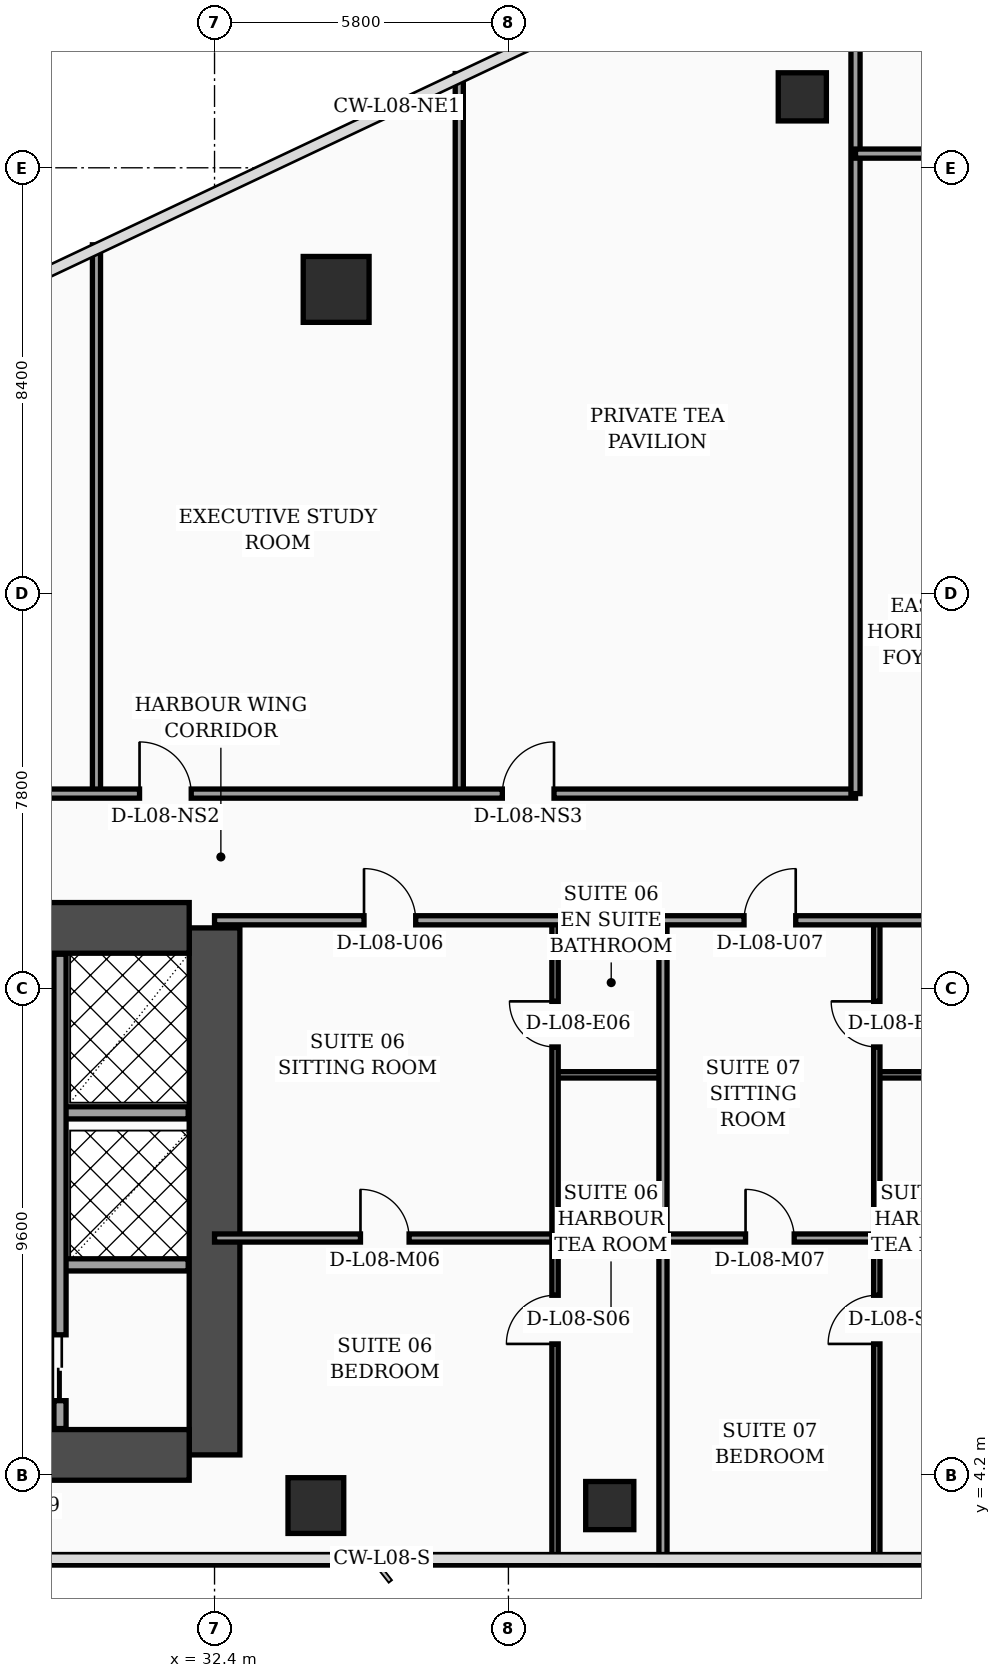
"""IFC4 building model, lengths in metres.
Left out: names, types, materials, properties, quantities, classifications, styles, units other than length and angle.
Written with IfcOpenShell. Run it as: python <this file> out.ifc"""

import sys

from ifc_helpers import new_model, si_unit, direction, frame, frame_2d, origin, origin_2d, place, context, subcontext, project, spatial, rectangle, hollow_rectangle, circle, extrude, element, fill, save


model = new_model("IFC4")
c1 = context("Model", 3, precision=1e-05, world=origin(), true_north=direction((0.0, 1.0)))
c2 = subcontext(c1, "Body", "Model", "MODEL_VIEW")
j1 = project(units=[si_unit("LENGTHUNIT", "METRE"), si_unit("PLANEANGLEUNIT", "RADIAN")], contexts=[c1])
p1 = place(None, origin())
s1 = spatial("IfcSite", under=j1, at=p1, CompositionType="ELEMENT")
p2 = place(p1, origin())
s2 = spatial("IfcBuilding", under=s1, at=p2, CompositionType="ELEMENT")
p3 = place(p2, frame((0.0, 0.0, 38.4)))
s3 = spatial("IfcBuildingStorey", under=s2, at=p3, CompositionType="ELEMENT", Elevation=38.4)
p4 = place(p3, frame((32.4, 4.6, 0.0), z_axis=(0.0, 0.0, 1.0), x_axis=(0.0, 1.0, 0.0)))
e1 = element("IfcWall", 1, at=p4, inside=s3, PredefinedType="SHEAR", context=c2, shape_type="SweptSolid", body=[
    extrude(rectangle(XDim=10.4, YDim=1.0, at=frame_2d((5.2, 0.0))), origin(), (0.0, 0.0, 1.0), 3.56),
])
p5 = place(p3, frame((22.1, 15.0, 0.0), z_axis=(0.0, 0.0, 1.0), x_axis=(1.0, 0.0, 0.0)))
e2 = element("IfcWall", 2, at=p5, inside=s3, PredefinedType="SHEAR", context=c2, shape_type="SweptSolid", body=[
    extrude(rectangle(XDim=9.8, YDim=1.0, at=frame_2d((4.9, 0.0))), origin(), (0.0, 0.0, 1.0), 3.56),
])
p6 = place(p5, frame((4.8, 0.0, 0.0)))
e3 = element("IfcOpeningElement", 3, at=p6, cuts=e2, PredefinedType="OPENING", context=c2, shape_type="SweptSolid", body=[
    extrude(rectangle(XDim=1.1, YDim=2.2, at=frame_2d((0.55, 1.1))), frame((0.0, 0.51, 0.0), z_axis=(0.0, -1.0, 0.0), x_axis=(1.0, 0.0, 0.0)), (0.0, 0.0, 1.0), 1.02),
])
p7 = place(p3, frame((22.1, 4.6, 0.0), z_axis=(0.0, 0.0, 1.0), x_axis=(1.0, 0.0, 0.0)))
e4 = element("IfcWall", 4, at=p7, inside=s3, PredefinedType="SHEAR", context=c2, shape_type="SweptSolid", body=[
    extrude(rectangle(XDim=9.8, YDim=1.0, at=frame_2d((4.9, 0.0))), origin(), (0.0, 0.0, 1.0), 3.56),
])
p8 = place(p3, frame((34.4, 3.6, 0.0), z_axis=(0.0, 0.0, 1.0), x_axis=(1.0, 0.0, 0.0)))
e5 = element("IfcColumn", 5, at=p8, inside=s3, PredefinedType="COLUMN", context=c2, shape_type="SweptSolid", body=[
    extrude(hollow_rectangle(XDim=1.1, YDim=1.1, WallThickness=0.045, at=origin_2d()), origin(), (0.0, 0.0, 1.0), 3.56),
])
p9 = place(p3, frame((40.2, 3.6, 0.0), z_axis=(0.0, 0.0, 1.0), x_axis=(1.0, 0.0, 0.0)))
e6 = element("IfcColumn", 6, at=p9, inside=s3, PredefinedType="COLUMN", context=c2, shape_type="SweptSolid", body=[
    extrude(hollow_rectangle(XDim=0.95, YDim=0.95, WallThickness=0.04, at=origin_2d()), origin(), (0.0, 0.0, 1.0), 3.56),
])
p10 = place(p3, frame((34.8, 27.6, 0.0), z_axis=(0.0, 0.0, 1.0), x_axis=(1.0, 0.0, 0.0)))
e7 = element("IfcColumn", 7, at=p10, inside=s3, PredefinedType="COLUMN", context=c2, shape_type="SweptSolid", body=[
    extrude(circle(Radius=0.65, at=origin_2d()), origin(), (0.0, 0.0, 1.0), 3.56),
])
p11 = place(p3, frame((44.0, 31.4, 0.0), z_axis=(0.0, 0.0, 1.0), x_axis=(1.0, 0.0, 0.0)))
e8 = element("IfcColumn", 8, at=p11, inside=s3, PredefinedType="COLUMN", context=c2, shape_type="SweptSolid", body=[
    extrude(hollow_rectangle(XDim=0.95, YDim=0.95, WallThickness=0.04, at=origin_2d()), origin(), (0.0, 0.0, 1.0), 3.56),
])
p12 = place(p3, frame((27.02, 11.35, 0.0), z_axis=(0.0, 0.0, 1.0), x_axis=(1.0, 0.0, 0.0)))
e9 = element("IfcWall", 9, at=p12, inside=s3, PredefinedType="SOLIDWALL", context=c2, shape_type="SweptSolid", body=[
    extrude(rectangle(XDim=4.86, YDim=0.24, at=frame_2d((2.43, 0.0))), origin(), (0.0, 0.0, 1.0), 3.56),
])
p13 = place(p12, frame((0.45, 0.0, 0.0)))
e10 = element("IfcOpeningElement", 10, at=p13, cuts=e9, PredefinedType="OPENING", context=c2, shape_type="SweptSolid", body=[
    extrude(rectangle(XDim=1.3, YDim=2.35, at=frame_2d((0.65, 1.175))), frame((0.0, 0.13, 0.0), z_axis=(0.0, -1.0, 0.0), x_axis=(1.0, 0.0, 0.0)), (0.0, 0.0, 1.0), 0.26),
])
p14 = place(p3, frame((27.02, 8.35, 0.0), z_axis=(0.0, 0.0, 1.0), x_axis=(1.0, 0.0, 0.0)))
e11 = element("IfcWall", 11, at=p14, inside=s3, PredefinedType="SOLIDWALL", context=c2, shape_type="SweptSolid", body=[
    extrude(rectangle(XDim=4.86, YDim=0.24, at=frame_2d((2.43, 0.0))), origin(), (0.0, 0.0, 1.0), 3.56),
])
p15 = place(p3, frame((29.35, 5.12, 0.0), z_axis=(0.0, 0.0, 1.0), x_axis=(0.0, 1.0, 0.0)))
e12 = element("IfcWall", 12, at=p15, inside=s3, PredefinedType="SOLIDWALL", context=c2, shape_type="SweptSolid", body=[
    extrude(rectangle(XDim=9.36, YDim=0.24, at=frame_2d((4.68, 0.0))), origin(), (0.0, 0.0, 1.0), 3.56),
])
p16 = place(p15, frame((0.55, 0.0, 0.0)))
e13 = element("IfcOpeningElement", 13, at=p16, cuts=e12, PredefinedType="OPENING", context=c2, shape_type="SweptSolid", body=[
    extrude(rectangle(XDim=1.3, YDim=2.35, at=frame_2d((0.65, 1.175))), frame((0.0, 0.13, 0.0), z_axis=(0.0, -1.0, 0.0), x_axis=(1.0, 0.0, 0.0)), (0.0, 0.0, 1.0), 0.26),
])
p17 = place(p3, frame((39.12, 12.1, 0.0), z_axis=(0.0, 0.0, 1.0), x_axis=(1.0, 0.0, 0.0)))
e14 = element("IfcWall", 14, at=p17, inside=s3, PredefinedType="PARTITIONING", context=c2, shape_type="SweptSolid", body=[
    extrude(rectangle(XDim=2.13, YDim=0.125, at=frame_2d((1.065, 0.0))), origin(), (0.0, 0.0, 1.0), 3.56),
])
p18 = place(p3, frame((32.4, 8.88, 0.0), z_axis=(0.0, 0.0, 1.0), x_axis=(1.0, 0.0, 0.0)))
e15 = element("IfcWall", 15, at=p18, inside=s3, PredefinedType="PARTITIONING", context=c2, shape_type="SweptSolid", body=[
    extrude(rectangle(XDim=6.72, YDim=0.16, at=frame_2d((3.36, 0.0))), origin(), (0.0, 0.0, 1.0), 2.84),
])
p19 = place(p18, frame((2.88, 0.0, 0.0)))
e16 = element("IfcOpeningElement", 16, at=p19, cuts=e15, PredefinedType="OPENING", context=c2, shape_type="SweptSolid", body=[
    extrude(rectangle(XDim=0.96, YDim=2.2, at=frame_2d((0.48, 1.1))), frame((0.0, 0.09, 0.0), z_axis=(0.0, -1.0, 0.0), x_axis=(1.0, 0.0, 0.0)), (0.0, 0.0, 1.0), 0.18),
])
p20 = place(p3, frame((39.12, 2.44, 0.0), z_axis=(0.0, 0.0, 1.0), x_axis=(0.0, 1.0, 0.0)))
e17 = element("IfcWall", 17, at=p20, inside=s3, PredefinedType="PARTITIONING", context=c2, shape_type="SweptSolid", body=[
    extrude(rectangle(XDim=12.71, YDim=0.125, at=frame_2d((6.355, 0.0))), origin(), (0.0, 0.0, 1.0), 2.84),
])
p21 = place(p20, frame((4.35, 0.0, 0.0)))
e18 = element("IfcOpeningElement", 18, at=p21, cuts=e17, PredefinedType="OPENING", context=c2, shape_type="SweptSolid", body=[
    extrude(rectangle(XDim=0.96, YDim=2.2, at=frame_2d((0.48, 1.1))), frame((0.0, 0.073, 0.0), z_axis=(0.0, -1.0, 0.0), x_axis=(1.0, 0.0, 0.0)), (0.0, 0.0, 1.0), 0.145),
])
p22 = place(p20, frame((10.21, 0.0, 0.0)))
e19 = element("IfcOpeningElement", 19, at=p22, cuts=e17, PredefinedType="OPENING", context=c2, shape_type="SweptSolid", body=[
    extrude(rectangle(XDim=0.9, YDim=2.15, at=frame_2d((0.45, 1.075))), frame((0.0, 0.073, 0.0), z_axis=(0.0, -1.0, 0.0), x_axis=(1.0, 0.0, 0.0)), (0.0, 0.0, 1.0), 0.145),
])
p23 = place(p3, frame((45.47, 12.1, 0.0), z_axis=(0.0, 0.0, 1.0), x_axis=(1.0, 0.0, 0.0)))
e20 = element("IfcWall", 20, at=p23, inside=s3, PredefinedType="PARTITIONING", context=c2, shape_type="SweptSolid", body=[
    extrude(rectangle(XDim=1.93, YDim=0.125, at=frame_2d((0.965, 0.0))), origin(), (0.0, 0.0, 1.0), 2.84),
])
p24 = place(p3, frame((41.25, 8.88, 0.0), z_axis=(0.0, 0.0, 1.0), x_axis=(1.0, 0.0, 0.0)))
e21 = element("IfcWall", 21, at=p24, inside=s3, PredefinedType="PARTITIONING", context=c2, shape_type="SweptSolid", body=[
    extrude(rectangle(XDim=4.22, YDim=0.16, at=frame_2d((2.11, 0.0))), origin(), (0.0, 0.0, 1.0), 3.56),
])
p25 = place(p24, frame((1.63, 0.0, 0.0)))
e22 = element("IfcOpeningElement", 22, at=p25, cuts=e21, PredefinedType="OPENING", context=c2, shape_type="SweptSolid", body=[
    extrude(rectangle(XDim=0.96, YDim=2.2, at=frame_2d((0.48, 1.1))), frame((0.0, 0.09, 0.0), z_axis=(0.0, -1.0, 0.0), x_axis=(1.0, 0.0, 0.0)), (0.0, 0.0, 1.0), 0.18),
])
p26 = place(p3, frame((45.47, 2.44, 0.0), z_axis=(0.0, 0.0, 1.0), x_axis=(0.0, 1.0, 0.0)))
e23 = element("IfcWall", 23, at=p26, inside=s3, PredefinedType="PARTITIONING", context=c2, shape_type="SweptSolid", body=[
    extrude(rectangle(XDim=12.71, YDim=0.125, at=frame_2d((6.355, 0.0))), origin(), (0.0, 0.0, 1.0), 3.04),
])
p27 = place(p26, frame((4.35, 0.0, 0.0)))
e24 = element("IfcOpeningElement", 24, at=p27, cuts=e23, PredefinedType="OPENING", context=c2, shape_type="SweptSolid", body=[
    extrude(rectangle(XDim=0.96, YDim=2.2, at=frame_2d((0.48, 1.1))), frame((0.0, 0.073, 0.0), z_axis=(0.0, -1.0, 0.0), x_axis=(1.0, 0.0, 0.0)), (0.0, 0.0, 1.0), 0.145),
])
p28 = place(p26, frame((10.21, 0.0, 0.0)))
e25 = element("IfcOpeningElement", 25, at=p28, cuts=e23, PredefinedType="OPENING", context=c2, shape_type="SweptSolid", body=[
    extrude(rectangle(XDim=0.9, YDim=2.15, at=frame_2d((0.45, 1.075))), frame((0.0, 0.073, 0.0), z_axis=(0.0, -1.0, 0.0), x_axis=(1.0, 0.0, 0.0)), (0.0, 0.0, 1.0), 0.145),
])
p29 = place(p3, frame((41.25, 2.44, 0.0), z_axis=(0.0, 0.0, 1.0), x_axis=(0.0, 1.0, 0.0)))
e26 = element("IfcWall", 26, at=p29, inside=s3, PredefinedType="PARTITIONING", context=c2, shape_type="SweptSolid", body=[
    extrude(rectangle(XDim=12.71, YDim=0.16, at=frame_2d((6.355, 0.0))), origin(), (0.0, 0.0, 1.0), 3.04),
])
p30 = place(p3, frame((32.4, 15.15, 0.0), z_axis=(0.0, 0.0, 1.0), x_axis=(1.0, 0.0, 0.0)))
e27 = element("IfcWall", 27, at=p30, inside=s3, PredefinedType="PARTITIONING", context=c2, shape_type="SweptSolid", body=[
    extrude(rectangle(XDim=15.0, YDim=0.18, at=frame_2d((7.5, 0.0))), origin(), (0.0, 0.0, 1.0), 2.84),
])
p31 = place(p30, frame((2.95, 0.0, 0.0)))
e28 = element("IfcOpeningElement", 28, at=p31, cuts=e27, PredefinedType="OPENING", context=c2, shape_type="SweptSolid", body=[
    extrude(rectangle(XDim=1.02, YDim=2.2, at=frame_2d((0.51, 1.1))), frame((0.0, 0.1, 0.0), z_axis=(0.0, -1.0, 0.0), x_axis=(1.0, 0.0, 0.0)), (0.0, 0.0, 1.0), 0.2),
])
p32 = place(p30, frame((10.45, 0.0, 0.0)))
e29 = element("IfcOpeningElement", 29, at=p32, cuts=e27, PredefinedType="OPENING", context=c2, shape_type="SweptSolid", body=[
    extrude(rectangle(XDim=1.02, YDim=2.2, at=frame_2d((0.51, 1.1))), frame((0.0, 0.1, 0.0), z_axis=(0.0, -1.0, 0.0), x_axis=(1.0, 0.0, 0.0)), (0.0, 0.0, 1.0), 0.2),
])
p33 = place(p3, frame((30.07, 17.65, 0.0), z_axis=(0.0, 0.0, 1.0), x_axis=(0.0, 1.0, 0.0)))
e30 = element("IfcWall", 30, at=p33, inside=s3, PredefinedType="PARTITIONING", context=c2, shape_type="SweptSolid", body=[
    extrude(rectangle(XDim=10.83, YDim=0.16, at=frame_2d((5.415, 0.0))), origin(), (0.0, 0.0, 1.0), 2.84),
])
p34 = place(p3, frame((37.23, 17.65, 0.0), z_axis=(0.0, 0.0, 1.0), x_axis=(0.0, 1.0, 0.0)))
e31 = element("IfcWall", 31, at=p34, inside=s3, PredefinedType="PARTITIONING", context=c2, shape_type="SweptSolid", body=[
    extrude(rectangle(XDim=14.21, YDim=0.16, at=frame_2d((7.105, 0.0))), origin(), (0.0, 0.0, 1.0), 2.84),
])
p35 = place(p3, frame((21.5, 17.65, 0.0), z_axis=(0.0, 0.0, 1.0), x_axis=(1.0, 0.0, 0.0)))
e32 = element("IfcWall", 32, at=p35, inside=s3, PredefinedType="PARTITIONING", context=c2, shape_type="SweptSolid", body=[
    extrude(rectangle(XDim=23.55, YDim=0.18, at=frame_2d((11.775, 0.0))), origin(), (0.0, 0.0, 1.0), 2.84),
])
p36 = place(p35, frame((0.95, 0.0, 0.0)))
e33 = element("IfcOpeningElement", 33, at=p36, cuts=e32, PredefinedType="OPENING", context=c2, shape_type="SweptSolid", body=[
    extrude(rectangle(XDim=1.02, YDim=2.2, at=frame_2d((0.51, 1.1))), frame((0.0, 0.1, 0.0), z_axis=(0.0, -1.0, 0.0), x_axis=(1.0, 0.0, 0.0)), (0.0, 0.0, 1.0), 0.2),
])
p37 = place(p35, frame((9.42, 0.0, 0.0)))
e34 = element("IfcOpeningElement", 34, at=p37, cuts=e32, PredefinedType="OPENING", context=c2, shape_type="SweptSolid", body=[
    extrude(rectangle(XDim=1.02, YDim=2.2, at=frame_2d((0.51, 1.1))), frame((0.0, 0.1, 0.0), z_axis=(0.0, -1.0, 0.0), x_axis=(1.0, 0.0, 0.0)), (0.0, 0.0, 1.0), 0.2),
])
p38 = place(p35, frame((16.58, 0.0, 0.0)))
e35 = element("IfcOpeningElement", 35, at=p38, cuts=e32, PredefinedType="OPENING", context=c2, shape_type="SweptSolid", body=[
    extrude(rectangle(XDim=1.02, YDim=2.2, at=frame_2d((0.51, 1.1))), frame((0.0, 0.1, 0.0), z_axis=(0.0, -1.0, 0.0), x_axis=(1.0, 0.0, 0.0)), (0.0, 0.0, 1.0), 0.2),
])
p39 = place(p3, frame((45.05, 17.65, 0.0), z_axis=(0.0, 0.0, 1.0), x_axis=(0.0, 1.0, 0.0)))
e36 = element("IfcWall", 36, at=p39, inside=s3, PredefinedType="PARTITIONING", context=c2, shape_type="SweptSolid", body=[
    extrude(rectangle(XDim=17.9, YDim=0.18, at=frame_2d((8.95, 0.0))), origin(), (0.0, 0.0, 1.0), 2.84),
])
p40 = place(p3, frame((45.05, 30.28, 0.0), z_axis=(0.0, 0.0, 1.0), x_axis=(1.0, 0.0, 0.0)))
e37 = element("IfcWall", 37, at=p40, inside=s3, PredefinedType="PARTITIONING", context=c2, shape_type="SweptSolid", body=[
    extrude(rectangle(XDim=2.35, YDim=0.18, at=frame_2d((1.175, 0.0))), origin(), (0.0, 0.0, 1.0), 3.56),
])
p41 = place(p16, origin())
e38 = element("IfcDoor", 38, at=p41, inside=s3, OperationType="DOUBLE_DOOR_SLIDING", PredefinedType="DOOR", context=c2, shape_type="SweptSolid", body=[
    extrude(rectangle(XDim=1.3, YDim=2.35, at=frame_2d((0.65, 1.175))), frame((0.0, 0.025, 0.0), z_axis=(0.0, -1.0, 0.0), x_axis=(1.0, 0.0, 0.0)), (0.0, 0.0, 1.0), 0.05),
])
fill(e13, e38)
p42 = place(p19, origin())
e39 = element("IfcDoor", 39, at=p42, inside=s3, OperationType="SINGLE_SWING_LEFT", PredefinedType="DOOR", context=c2, shape_type="SweptSolid", body=[
    extrude(rectangle(XDim=0.96, YDim=2.2, at=frame_2d((0.48, 1.1))), frame((0.0, 0.025, 0.0), z_axis=(0.0, -1.0, 0.0), x_axis=(1.0, 0.0, 0.0)), (0.0, 0.0, 1.0), 0.05),
])
fill(e16, e39)
p43 = place(p21, origin())
e40 = element("IfcDoor", 40, at=p43, inside=s3, OperationType="SINGLE_SWING_LEFT", PredefinedType="DOOR", context=c2, shape_type="SweptSolid", body=[
    extrude(rectangle(XDim=0.96, YDim=2.2, at=frame_2d((0.48, 1.1))), frame((0.0, 0.025, 0.0), z_axis=(0.0, -1.0, 0.0), x_axis=(1.0, 0.0, 0.0)), (0.0, 0.0, 1.0), 0.05),
])
fill(e18, e40)
p44 = place(p22, origin())
e41 = element("IfcDoor", 41, at=p44, inside=s3, OperationType="SINGLE_SWING_RIGHT", PredefinedType="DOOR", context=c2, shape_type="SweptSolid", body=[
    extrude(rectangle(XDim=0.9, YDim=2.15, at=frame_2d((0.45, 1.075))), frame((0.0, 0.025, 0.0), z_axis=(0.0, -1.0, 0.0), x_axis=(1.0, 0.0, 0.0)), (0.0, 0.0, 1.0), 0.05),
])
fill(e19, e41)
p45 = place(p25, origin())
e42 = element("IfcDoor", 42, at=p45, inside=s3, OperationType="SINGLE_SWING_LEFT", PredefinedType="DOOR", context=c2, shape_type="SweptSolid", body=[
    extrude(rectangle(XDim=0.96, YDim=2.2, at=frame_2d((0.48, 1.1))), frame((0.0, 0.025, 0.0), z_axis=(0.0, -1.0, 0.0), x_axis=(1.0, 0.0, 0.0)), (0.0, 0.0, 1.0), 0.05),
])
fill(e22, e42)
p46 = place(p27, origin())
e43 = element("IfcDoor", 43, at=p46, inside=s3, OperationType="SINGLE_SWING_LEFT", PredefinedType="DOOR", context=c2, shape_type="SweptSolid", body=[
    extrude(rectangle(XDim=0.96, YDim=2.2, at=frame_2d((0.48, 1.1))), frame((0.0, 0.025, 0.0), z_axis=(0.0, -1.0, 0.0), x_axis=(1.0, 0.0, 0.0)), (0.0, 0.0, 1.0), 0.05),
])
fill(e24, e43)
p47 = place(p28, origin())
e44 = element("IfcDoor", 44, at=p47, inside=s3, OperationType="SINGLE_SWING_RIGHT", PredefinedType="DOOR", context=c2, shape_type="SweptSolid", body=[
    extrude(rectangle(XDim=0.9, YDim=2.15, at=frame_2d((0.45, 1.075))), frame((0.0, 0.025, 0.0), z_axis=(0.0, -1.0, 0.0), x_axis=(1.0, 0.0, 0.0)), (0.0, 0.0, 1.0), 0.05),
])
fill(e25, e44)
p48 = place(p31, origin())
e45 = element("IfcDoor", 45, at=p48, inside=s3, OperationType="SINGLE_SWING_LEFT", PredefinedType="DOOR", context=c2, shape_type="SweptSolid", body=[
    extrude(rectangle(XDim=1.02, YDim=2.2, at=frame_2d((0.51, 1.1))), frame((0.0, 0.025, 0.0), z_axis=(0.0, -1.0, 0.0), x_axis=(1.0, 0.0, 0.0)), (0.0, 0.0, 1.0), 0.05),
])
fill(e28, e45)
p49 = place(p32, origin())
e46 = element("IfcDoor", 46, at=p49, inside=s3, OperationType="SINGLE_SWING_RIGHT", PredefinedType="DOOR", context=c2, shape_type="SweptSolid", body=[
    extrude(rectangle(XDim=1.02, YDim=2.2, at=frame_2d((0.51, 1.1))), frame((0.0, 0.025, 0.0), z_axis=(0.0, -1.0, 0.0), x_axis=(1.0, 0.0, 0.0)), (0.0, 0.0, 1.0), 0.05),
])
fill(e29, e46)
p50 = place(p37, origin())
e47 = element("IfcDoor", 47, at=p50, inside=s3, OperationType="SINGLE_SWING_LEFT", PredefinedType="DOOR", context=c2, shape_type="SweptSolid", body=[
    extrude(rectangle(XDim=1.02, YDim=2.2, at=frame_2d((0.51, 1.1))), frame((0.0, 0.025, 0.0), z_axis=(0.0, -1.0, 0.0), x_axis=(1.0, 0.0, 0.0)), (0.0, 0.0, 1.0), 0.05),
])
fill(e34, e47)
p51 = place(p38, origin())
e48 = element("IfcDoor", 48, at=p51, inside=s3, OperationType="SINGLE_SWING_RIGHT", PredefinedType="DOOR", context=c2, shape_type="SweptSolid", body=[
    extrude(rectangle(XDim=1.02, YDim=2.2, at=frame_2d((0.51, 1.1))), frame((0.0, 0.025, 0.0), z_axis=(0.0, -1.0, 0.0), x_axis=(1.0, 0.0, 0.0)), (0.0, 0.0, 1.0), 0.05),
])
fill(e35, e48)
save(model, sys.argv[1])
